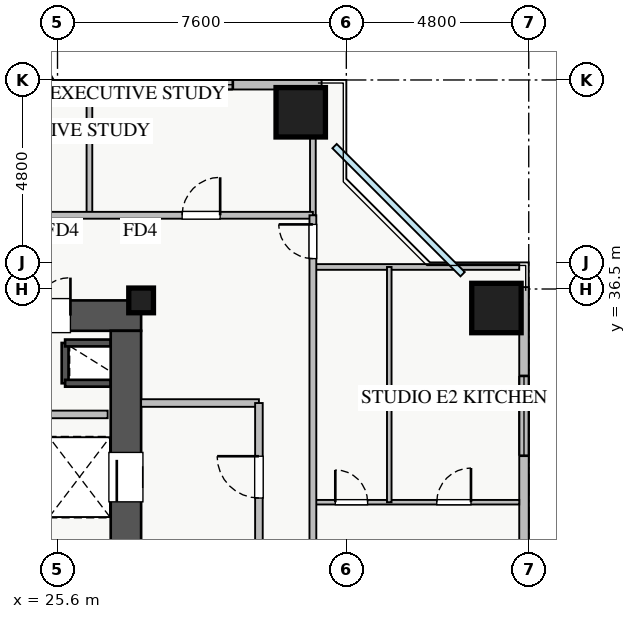
"""IFC4 building model, lengths in metres.
Left out: names, types, materials, properties, quantities, classifications, styles, units other than length and angle.
Written with IfcOpenShell. Run it as: python <this file> out.ifc"""

import sys

from ifc_helpers import new_model, si_unit, direction, frame, frame_2d, origin, origin_2d, place, context, subcontext, project, spatial, rectangle, extrude, source, transform, mapped, element, fill, save


model = new_model("IFC4")
c1 = context("Model", 3, precision=1e-05, world=origin(), true_north=direction((0.0, 1.0)))
c2 = subcontext(c1, "Body", "Model", "MODEL_VIEW")
j1 = project(units=[si_unit("LENGTHUNIT", "METRE"), si_unit("PLANEANGLEUNIT", "RADIAN")], contexts=[c1])
p1 = place(None, origin())
s1 = spatial("IfcSite", under=j1, at=p1, CompositionType="ELEMENT")
p2 = place(p1, origin())
s2 = spatial("IfcBuilding", under=s1, at=p2, CompositionType="ELEMENT")
p3 = place(p2, frame((0.0, 0.0, 69.75)))
s3 = spatial("IfcBuildingStorey", under=s2, at=p3, CompositionType="ELEMENT", Elevation=69.75)
p4 = place(p3, frame((25.8, 34.02, 0.0), z_axis=(0.0, 0.0, 1.0), x_axis=(0.0, 1.0, 0.0)))
e1 = element("IfcWall", 1, at=p4, inside=s3, PredefinedType="SHEAR", context=c2, shape_type="SweptSolid", body=[
    extrude(rectangle(XDim=1.06, YDim=0.18, at=frame_2d((0.53, 0.0))), origin(), (0.0, 0.0, 1.0), 3.07),
])
for number, where, z_axis, x_axis in (
    (2, (25.8, 35.08, 0.0), (0.0, 0.0, 1.0), (1.0, 0.0, 0.0)),
    (3, (25.8, 34.02, 0.0), (0.0, 0.0, 1.0), (1.0, 0.0, 0.0)),
):
    element("IfcWall", number, at=place(p3, frame(where, z_axis=z_axis, x_axis=x_axis)), inside=s3, PredefinedType="SHEAR", context=c2, shape_type="SweptSolid", body=[
        extrude(rectangle(XDim=1.2, YDim=0.18, at=frame_2d((0.6, 0.0))), origin(), (0.0, 0.0, 1.0), 3.07),
    ])
p5 = place(p3, frame((10.2, 35.8, 0.0), z_axis=(0.0, 0.0, 1.0), x_axis=(1.0, 0.0, 0.0)))
e4 = element("IfcWall", 4, at=p5, inside=s3, PredefinedType="SHEAR", context=c2, shape_type="SweptSolid", body=[
    extrude(rectangle(XDim=17.6, YDim=0.8, at=frame_2d((8.8, 0.0))), origin(), (0.0, 0.0, 1.0), 3.25),
])
p6 = place(p5, frame((1.15, 0.0, 0.0)))
e5 = element("IfcOpeningElement", 5, at=p6, cuts=e4, PredefinedType="OPENING", context=c2, shape_type="SweptSolid", body=[
    extrude(rectangle(XDim=1.1, YDim=2.05, at=frame_2d((0.55, 1.025))), frame((0.0, 0.41, 0.0), z_axis=(0.0, -1.0, 0.0), x_axis=(1.0, 0.0, 0.0)), (0.0, 0.0, 1.0), 0.82),
])
p7 = place(p5, frame((8.3, 0.0, 0.0)))
e6 = element("IfcOpeningElement", 6, at=p7, cuts=e4, PredefinedType="OPENING", context=c2, shape_type="SweptSolid", body=[
    extrude(rectangle(XDim=1.1, YDim=2.05, at=frame_2d((0.55, 1.025))), frame((0.0, 0.41, 0.0), z_axis=(0.0, -1.0, 0.0), x_axis=(1.0, 0.0, 0.0)), (0.0, 0.0, 1.0), 0.82),
])
p8 = place(p5, frame((10.05, 0.0, 0.0)))
e7 = element("IfcOpeningElement", 7, at=p8, cuts=e4, PredefinedType="OPENING", context=c2, shape_type="SweptSolid", body=[
    extrude(rectangle(XDim=1.1, YDim=2.05, at=frame_2d((0.55, 1.025))), frame((0.0, 0.41, 0.0), z_axis=(0.0, -1.0, 0.0), x_axis=(1.0, 0.0, 0.0)), (0.0, 0.0, 1.0), 0.82),
])
p9 = place(p5, frame((14.74, 0.0, 0.0)))
e8 = element("IfcOpeningElement", 8, at=p9, cuts=e4, PredefinedType="OPENING", context=c2, shape_type="SweptSolid", body=[
    extrude(rectangle(XDim=1.0, YDim=2.05, at=frame_2d((0.5, 1.025))), frame((0.0, 0.41, 0.0), z_axis=(0.0, -1.0, 0.0), x_axis=(1.0, 0.0, 0.0)), (0.0, 0.0, 1.0), 0.82),
])
p10 = place(p5, frame((11.835, 0.0, 0.0)))
e9 = element("IfcOpeningElement", 9, at=p10, cuts=e4, PredefinedType="OPENING", context=c2, shape_type="SweptSolid", body=[
    extrude(rectangle(XDim=1.0, YDim=2.05, at=frame_2d((0.5, 1.025))), frame((0.0, 0.41, 0.0), z_axis=(0.0, -1.0, 0.0), x_axis=(1.0, 0.0, 0.0)), (0.0, 0.0, 1.0), 0.82),
])
p11 = place(p5, frame((13.37, 0.0, 0.0)))
e10 = element("IfcOpeningElement", 10, at=p11, cuts=e4, PredefinedType="OPENING", context=c2, shape_type="SweptSolid", body=[
    extrude(rectangle(XDim=1.0, YDim=2.05, at=frame_2d((0.5, 1.025))), frame((0.0, 0.41, 0.0), z_axis=(0.0, -1.0, 0.0), x_axis=(1.0, 0.0, 0.0)), (0.0, 0.0, 1.0), 0.82),
])
p12 = place(p3, frame((27.4, 29.8, 0.0), z_axis=(0.0, 0.0, 1.0), x_axis=(0.0, 1.0, 0.0)))
e11 = element("IfcWall", 11, at=p12, inside=s3, PredefinedType="SHEAR", context=c2, shape_type="SweptSolid", body=[
    extrude(rectangle(XDim=5.6, YDim=0.8, at=frame_2d((2.8, 0.0))), origin(), (0.0, 0.0, 1.0), 3.25),
])
p13 = place(p12, frame((1.1, 0.0, 0.0)))
e12 = element("IfcOpeningElement", 12, at=p13, cuts=e11, PredefinedType="OPENING", context=c2, shape_type="SweptSolid", body=[
    extrude(rectangle(XDim=1.3, YDim=2.05, at=frame_2d((0.65, 1.025))), frame((0.0, 0.41, 0.0), z_axis=(0.0, -1.0, 0.0), x_axis=(1.0, 0.0, 0.0)), (0.0, 0.0, 1.0), 0.82),
])
m1 = source(origin(), c2, "Body", "SweptSolid", [
    extrude(rectangle(XDim=0.65, YDim=0.65, at=origin_2d()), origin(), (0.0, 0.0, 1.0), 3.25),
])
p14 = place(p3, frame((27.8, 36.2, 0.0), z_axis=(0.0, 0.0, 1.0), x_axis=(1.0, 0.0, 0.0)))
e13 = element("IfcColumn", 13, at=p14, inside=s3, PredefinedType="PILASTER", context=c2, shape_type="MappedRepresentation", body=[
    mapped(m1, transform((0.0, 0.0, 0.0), x_axis=(1.0, 0.0, 0.0), y_axis=(0.0, 1.0, 0.0), z_axis=(0.0, 0.0, 1.0), scale=1.0)),
])
m2 = source(origin(), c2, "Body", "SweptSolid", [
    extrude(rectangle(XDim=1.3, YDim=1.3, at=origin_2d()), origin(), (0.0, 0.0, 1.0), 3.25),
])
for number, where, z_axis, x_axis in (
    (14, (37.15, 36.0, 0.0), (0.0, 0.0, 1.0), (1.0, 0.0, 0.0)),
    (15, (32.0, 41.15, 0.0), (0.0, 0.0, 1.0), (1.0, 0.0, 0.0)),
):
    element("IfcColumn", number, at=place(p3, frame(where, z_axis=z_axis, x_axis=x_axis)), inside=s3, PredefinedType="COLUMN", context=c2, shape_type="MappedRepresentation", body=[
        mapped(m2, transform((0.0, 0.0, 0.0), x_axis=(1.0, 0.0, 0.0), y_axis=(0.0, 1.0, 0.0), z_axis=(0.0, 0.0, 1.0), scale=1.0)),
    ])
p15 = place(p3, frame((5.45, 41.875, 0.0), z_axis=(0.0, 0.0, 1.0), x_axis=(1.0, 0.0, 0.0)))
e16 = element("IfcWall", 16, at=p15, inside=s3, PredefinedType="STANDARD", context=c2, shape_type="SweptSolid", body=[
    extrude(rectangle(XDim=27.1, YDim=0.25, at=frame_2d((13.55, 0.0))), origin(), (0.0, 0.0, 1.0), 2.61),
])
p16 = place(p15, frame((14.4, 0.0, 0.0)))
e17 = element("IfcOpeningElement", 17, at=p16, cuts=e16, PredefinedType="OPENING", context=c2, shape_type="SweptSolid", body=[
    extrude(rectangle(XDim=1.2, YDim=2.1, at=frame_2d((0.6, 1.05))), frame((0.0, 0.135, 0.0), z_axis=(0.0, -1.0, 0.0), x_axis=(1.0, 0.0, 0.0)), (0.0, 0.0, 1.0), 0.27),
])
p17 = place(p15, frame((1.48, 0.0, 0.9)))
e18 = element("IfcOpeningElement", 18, at=p17, cuts=e16, PredefinedType="OPENING", context=c2, shape_type="SweptSolid", body=[
    extrude(rectangle(XDim=1.5, YDim=1.5, at=frame_2d((0.75, 0.75))), frame((0.0, 0.135, 0.0), z_axis=(0.0, -1.0, 0.0), x_axis=(1.0, 0.0, 0.0)), (0.0, 0.0, 1.0), 0.27),
])
p18 = place(p15, frame((7.725, 0.0, 0.9)))
e19 = element("IfcOpeningElement", 19, at=p18, cuts=e16, PredefinedType="OPENING", context=c2, shape_type="SweptSolid", body=[
    extrude(rectangle(XDim=1.8, YDim=1.5, at=frame_2d((0.9, 0.75))), frame((0.0, 0.135, 0.0), z_axis=(0.0, -1.0, 0.0), x_axis=(1.0, 0.0, 0.0)), (0.0, 0.0, 1.0), 0.27),
])
p19 = place(p15, frame((17.92, 0.0, 0.9)))
e20 = element("IfcOpeningElement", 20, at=p19, cuts=e16, PredefinedType="OPENING", context=c2, shape_type="SweptSolid", body=[
    extrude(rectangle(XDim=1.5, YDim=1.5, at=frame_2d((0.75, 0.75))), frame((0.0, 0.135, 0.0), z_axis=(0.0, -1.0, 0.0), x_axis=(1.0, 0.0, 0.0)), (0.0, 0.0, 1.0), 0.27),
])
p20 = place(p15, frame((22.663, 0.0, 0.9)))
e21 = element("IfcOpeningElement", 21, at=p20, cuts=e16, PredefinedType="OPENING", context=c2, shape_type="SweptSolid", body=[
    extrude(rectangle(XDim=2.1, YDim=1.48, at=frame_2d((1.05, 0.74))), frame((0.0, 0.135, 0.0), z_axis=(0.0, -1.0, 0.0), x_axis=(1.0, 0.0, 0.0)), (0.0, 0.0, 1.0), 0.27),
])
p21 = place(p15, frame((5.114, 0.0, 0.9)))
e22 = element("IfcOpeningElement", 22, at=p21, cuts=e16, PredefinedType="OPENING", context=c2, shape_type="SweptSolid", body=[
    extrude(rectangle(XDim=2.4, YDim=1.5, at=frame_2d((1.2, 0.75))), frame((0.0, 0.135, 0.0), z_axis=(0.0, -1.0, 0.0), x_axis=(1.0, 0.0, 0.0)), (0.0, 0.0, 1.0), 0.27),
])
p22 = place(p15, frame((10.893, 0.0, 0.9)))
e23 = element("IfcOpeningElement", 23, at=p22, cuts=e16, PredefinedType="OPENING", context=c2, shape_type="SweptSolid", body=[
    extrude(rectangle(XDim=2.4, YDim=1.5, at=frame_2d((1.2, 0.75))), frame((0.0, 0.135, 0.0), z_axis=(0.0, -1.0, 0.0), x_axis=(1.0, 0.0, 0.0)), (0.0, 0.0, 1.0), 0.27),
])
p23 = place(p3, frame((37.875, 9.45, 0.0), z_axis=(0.0, 0.0, 1.0), x_axis=(0.0, 1.0, 0.0)))
e24 = element("IfcWall", 24, at=p23, inside=s3, PredefinedType="STANDARD", context=c2, shape_type="SweptSolid", body=[
    extrude(rectangle(XDim=27.1, YDim=0.25, at=frame_2d((13.55, 0.0))), origin(), (0.0, 0.0, 1.0), 2.61),
])
p24 = place(p23, frame((14.4, 0.0, 0.0)))
e25 = element("IfcOpeningElement", 25, at=p24, cuts=e24, PredefinedType="OPENING", context=c2, shape_type="SweptSolid", body=[
    extrude(rectangle(XDim=1.2, YDim=2.1, at=frame_2d((0.6, 1.05))), frame((0.0, 0.135, 0.0), z_axis=(0.0, -1.0, 0.0), x_axis=(1.0, 0.0, 0.0)), (0.0, 0.0, 1.0), 0.27),
])
p25 = place(p23, frame((2.188, 0.0, 0.9)))
e26 = element("IfcOpeningElement", 26, at=p25, cuts=e24, PredefinedType="OPENING", context=c2, shape_type="SweptSolid", body=[
    extrude(rectangle(XDim=2.4, YDim=1.48, at=frame_2d((1.2, 0.74))), frame((0.0, 0.135, 0.0), z_axis=(0.0, -1.0, 0.0), x_axis=(1.0, 0.0, 0.0)), (0.0, 0.0, 1.0), 0.27),
])
p26 = place(p23, frame((22.663, 0.0, 0.9)))
e27 = element("IfcOpeningElement", 27, at=p26, cuts=e24, PredefinedType="OPENING", context=c2, shape_type="SweptSolid", body=[
    extrude(rectangle(XDim=2.1, YDim=1.48, at=frame_2d((1.05, 0.74))), frame((0.0, 0.135, 0.0), z_axis=(0.0, -1.0, 0.0), x_axis=(1.0, 0.0, 0.0)), (0.0, 0.0, 1.0), 0.27),
])
p27 = place(p23, frame((17.365, 0.0, 0.9)))
e28 = element("IfcOpeningElement", 28, at=p27, cuts=e24, PredefinedType="OPENING", context=c2, shape_type="SweptSolid", body=[
    extrude(rectangle(XDim=0.9, YDim=1.2, at=frame_2d((0.45, 0.6))), frame((0.0, 0.135, 0.0), z_axis=(0.0, -1.0, 0.0), x_axis=(1.0, 0.0, 0.0)), (0.0, 0.0, 1.0), 0.27),
])
p28 = place(p3, frame((27.8, 33.5, 0.0), z_axis=(0.0, 0.0, 1.0), x_axis=(1.0, 0.0, 0.0)))
e29 = element("IfcWall", 29, at=p28, inside=s3, PredefinedType="PARTITIONING", context=c2, shape_type="SweptSolid", body=[
    extrude(rectangle(XDim=3.1, YDim=0.2, at=frame_2d((1.55, 0.0))), origin(), (0.0, 0.0, 1.0), 3.07),
])
p29 = place(p3, frame((30.9, 29.6, 0.0), z_axis=(0.0, 0.0, 1.0), x_axis=(0.0, 1.0, 0.0)))
e30 = element("IfcWall", 30, at=p29, inside=s3, PredefinedType="PARTITIONING", context=c2, shape_type="SweptSolid", body=[
    extrude(rectangle(XDim=3.9, YDim=0.2, at=frame_2d((1.95, 0.0))), origin(), (0.0, 0.0, 1.0), 3.07),
])
p30 = place(p29, frame((1.4, 0.0, 0.0)))
e31 = element("IfcOpeningElement", 31, at=p30, cuts=e30, PredefinedType="OPENING", context=c2, shape_type="SweptSolid", body=[
    extrude(rectangle(XDim=1.1, YDim=2.05, at=frame_2d((0.55, 1.025))), frame((0.0, 0.11, 0.0), z_axis=(0.0, -1.0, 0.0), x_axis=(1.0, 0.0, 0.0)), (0.0, 0.0, 1.0), 0.22),
])
p31 = place(p3, frame((21.75, 33.2, 0.0), z_axis=(0.0, 0.0, 1.0), x_axis=(1.0, 0.0, 0.0)))
e32 = element("IfcWall", 32, at=p31, inside=s3, PredefinedType="PARTITIONING", context=c2, shape_type="SweptSolid", body=[
    extrude(rectangle(XDim=5.17, YDim=0.2, at=frame_2d((2.585, 0.0))), origin(), (0.0, 0.0, 1.0), 3.07),
])
for number, where, z_axis, x_axis in (
    (33, (26.44, 38.44, 0.0), (0.0, 0.0, 1.0), (0.0, 1.0, 0.0)),
    (34, (32.32, 38.44, 0.0), (0.0, 0.0, 1.0), (0.0, 1.0, 0.0)),
):
    element("IfcWall", number, at=place(p3, frame(where, z_axis=z_axis, x_axis=x_axis)), inside=s3, PredefinedType="PARTITIONING", context=c2, shape_type="SweptSolid", body=[
        extrude(rectangle(XDim=3.31, YDim=0.15, at=frame_2d((1.655, 0.0))), origin(), (0.0, 0.0, 1.0), 3.07),
    ])
p32 = place(p3, frame((8.78, 38.44, 0.0), z_axis=(0.0, 0.0, 1.0), x_axis=(1.0, 0.0, 0.0)))
e35 = element("IfcWall", 35, at=p32, inside=s3, PredefinedType="PARTITIONING", context=c2, shape_type="SweptSolid", body=[
    extrude(rectangle(XDim=23.54, YDim=0.18, at=frame_2d((11.77, 0.0))), origin(), (0.0, 0.0, 1.0), 3.07),
])
p33 = place(p32, frame((2.72, 0.0, 0.0)))
e36 = element("IfcOpeningElement", 36, at=p33, cuts=e35, PredefinedType="OPENING", context=c2, shape_type="SweptSolid", body=[
    extrude(rectangle(XDim=1.0, YDim=2.05, at=frame_2d((0.5, 1.025))), frame((0.0, 0.1, 0.0), z_axis=(0.0, -1.0, 0.0), x_axis=(1.0, 0.0, 0.0)), (0.0, 0.0, 1.0), 0.2),
])
p34 = place(p32, frame((9.23, 0.0, 0.0)))
e37 = element("IfcOpeningElement", 37, at=p34, cuts=e35, PredefinedType="OPENING", context=c2, shape_type="SweptSolid", body=[
    extrude(rectangle(XDim=1.0, YDim=2.05, at=frame_2d((0.5, 1.025))), frame((0.0, 0.1, 0.0), z_axis=(0.0, -1.0, 0.0), x_axis=(1.0, 0.0, 0.0)), (0.0, 0.0, 1.0), 0.2),
])
p35 = place(p32, frame((14.84, 0.0, 0.0)))
e38 = element("IfcOpeningElement", 38, at=p35, cuts=e35, PredefinedType="OPENING", context=c2, shape_type="SweptSolid", body=[
    extrude(rectangle(XDim=1.0, YDim=2.05, at=frame_2d((0.5, 1.025))), frame((0.0, 0.1, 0.0), z_axis=(0.0, -1.0, 0.0), x_axis=(1.0, 0.0, 0.0)), (0.0, 0.0, 1.0), 0.2),
])
p36 = place(p32, frame((20.1, 0.0, 0.0)))
e39 = element("IfcOpeningElement", 39, at=p36, cuts=e35, PredefinedType="OPENING", context=c2, shape_type="SweptSolid", body=[
    extrude(rectangle(XDim=1.0, YDim=2.05, at=frame_2d((0.5, 1.025))), frame((0.0, 0.1, 0.0), z_axis=(0.0, -1.0, 0.0), x_axis=(1.0, 0.0, 0.0)), (0.0, 0.0, 1.0), 0.2),
])
p37 = place(p3, frame((32.32, 37.08, 0.0), z_axis=(0.0, 0.0, 1.0), x_axis=(1.0, 0.0, 0.0)))
e40 = element("IfcWall", 40, at=p37, inside=s3, PredefinedType="PARTITIONING", context=c2, shape_type="SweptSolid", body=[
    extrude(rectangle(XDim=5.43, YDim=0.15, at=frame_2d((2.715, 0.0))), origin(), (0.0, 0.0, 1.0), 3.07),
])
p38 = place(p3, frame((32.32, 30.89, 0.0), z_axis=(0.0, 0.0, 1.0), x_axis=(1.0, 0.0, 0.0)))
e41 = element("IfcWall", 41, at=p38, inside=s3, PredefinedType="PLUMBINGWALL", context=c2, shape_type="SweptSolid", body=[
    extrude(rectangle(XDim=5.43, YDim=0.12, at=frame_2d((2.715, 0.0))), origin(), (0.0, 0.0, 1.0), 3.07),
])
p39 = place(p38, frame((0.59, 0.0, 0.0)))
e42 = element("IfcOpeningElement", 42, at=p39, cuts=e41, PredefinedType="OPENING", context=c2, shape_type="SweptSolid", body=[
    extrude(rectangle(XDim=0.85, YDim=2.05, at=frame_2d((0.425, 1.025))), frame((0.0, 0.07, 0.0), z_axis=(0.0, -1.0, 0.0), x_axis=(1.0, 0.0, 0.0)), (0.0, 0.0, 1.0), 0.14),
])
p40 = place(p38, frame((3.26, 0.0, 0.0)))
e43 = element("IfcOpeningElement", 43, at=p40, cuts=e41, PredefinedType="OPENING", context=c2, shape_type="SweptSolid", body=[
    extrude(rectangle(XDim=0.9, YDim=2.05, at=frame_2d((0.45, 1.025))), frame((0.0, 0.07, 0.0), z_axis=(0.0, -1.0, 0.0), x_axis=(1.0, 0.0, 0.0)), (0.0, 0.0, 1.0), 0.14),
])
p41 = place(p3, frame((34.33, 30.89, 0.0), z_axis=(0.0, 0.0, 1.0), x_axis=(0.0, 1.0, 0.0)))
e44 = element("IfcWall", 44, at=p41, inside=s3, PredefinedType="PLUMBINGWALL", context=c2, shape_type="SweptSolid", body=[
    extrude(rectangle(XDim=6.19, YDim=0.12, at=frame_2d((3.095, 0.0))), origin(), (0.0, 0.0, 1.0), 3.07),
])
p42 = place(p3, frame((32.32, 7.21, 0.0), z_axis=(0.0, 0.0, 1.0), x_axis=(0.0, 1.0, 0.0)))
e45 = element("IfcWall", 45, at=p42, inside=s3, PredefinedType="PARTITIONING", context=c2, shape_type="SweptSolid", body=[
    extrude(rectangle(XDim=31.23, YDim=0.18, at=frame_2d((15.615, 0.0))), origin(), (0.0, 0.0, 1.0), 2.765),
])
p43 = place(p42, frame((30.09, 0.0, 0.0)))
e46 = element("IfcOpeningElement", 46, at=p43, cuts=e45, PredefinedType="OPENING", context=c2, shape_type="SweptSolid", body=[
    extrude(rectangle(XDim=0.9, YDim=2.05, at=frame_2d((0.45, 1.025))), frame((0.0, 0.1, 0.0), z_axis=(0.0, -1.0, 0.0), x_axis=(1.0, 0.0, 0.0)), (0.0, 0.0, 1.0), 0.2),
])
p44 = place(p42, frame((0.415, 0.0, 0.0)))
e47 = element("IfcOpeningElement", 47, at=p44, cuts=e45, PredefinedType="OPENING", context=c2, shape_type="SweptSolid", body=[
    extrude(rectangle(XDim=0.9, YDim=2.05, at=frame_2d((0.45, 1.025))), frame((0.0, 0.1, 0.0), z_axis=(0.0, -1.0, 0.0), x_axis=(1.0, 0.0, 0.0)), (0.0, 0.0, 1.0), 0.2),
])
p45 = place(p42, frame((4.99, 0.0, 0.0)))
e48 = element("IfcOpeningElement", 48, at=p45, cuts=e45, PredefinedType="OPENING", context=c2, shape_type="SweptSolid", body=[
    extrude(rectangle(XDim=1.0, YDim=2.05, at=frame_2d((0.5, 1.025))), frame((0.0, 0.1, 0.0), z_axis=(0.0, -1.0, 0.0), x_axis=(1.0, 0.0, 0.0)), (0.0, 0.0, 1.0), 0.2),
])
p46 = place(p42, frame((19.355, 0.0, 0.0)))
e49 = element("IfcOpeningElement", 49, at=p46, cuts=e45, PredefinedType="OPENING", context=c2, shape_type="SweptSolid", body=[
    extrude(rectangle(XDim=1.0, YDim=2.05, at=frame_2d((0.5, 1.025))), frame((0.0, 0.1, 0.0), z_axis=(0.0, -1.0, 0.0), x_axis=(1.0, 0.0, 0.0)), (0.0, 0.0, 1.0), 0.2),
])
m3 = source(origin(), c2, "Body", "SweptSolid", [
    extrude(rectangle(XDim=2.1, YDim=1.48, at=frame_2d((1.05, 0.74))), frame((0.0, 0.03, 0.0), z_axis=(0.0, -1.0, 0.0), x_axis=(1.0, 0.0, 0.0)), (0.0, 0.0, 1.0), 0.06),
])
p47 = place(p20, origin())
e50 = element("IfcWindow", 50, at=p47, inside=s3, PartitioningType="TRIPLE_PANEL_VERTICAL", PredefinedType="WINDOW", context=c2, shape_type="MappedRepresentation", body=[
    mapped(m3, transform((0.0, 0.0, 0.0), x_axis=(1.0, 0.0, 0.0), y_axis=(0.0, 1.0, 0.0), z_axis=(0.0, 0.0, 1.0), scale=1.0)),
])
fill(e21, e50)
p48 = place(p26, origin())
e51 = element("IfcWindow", 51, at=p48, inside=s3, PartitioningType="TRIPLE_PANEL_VERTICAL", PredefinedType="WINDOW", context=c2, shape_type="MappedRepresentation", body=[
    mapped(m3, transform((0.0, 0.0, 0.0), x_axis=(1.0, 0.0, 0.0), y_axis=(0.0, 1.0, 0.0), z_axis=(0.0, 0.0, 1.0), scale=1.0)),
])
fill(e27, e51)
m4 = source(origin(), c2, "Body", "SweptSolid", [
    extrude(rectangle(XDim=1.3, YDim=2.05, at=frame_2d((0.65, 1.025))), frame((0.0, 0.025, 0.0), z_axis=(0.0, -1.0, 0.0), x_axis=(1.0, 0.0, 0.0)), (0.0, 0.0, 1.0), 0.05),
])
p49 = place(p13, origin())
e52 = element("IfcDoor", 52, at=p49, inside=s3, OperationType="SLIDING_TO_LEFT", PredefinedType="DOOR", context=c2, shape_type="MappedRepresentation", body=[
    mapped(m4, transform((0.0, 0.0, 0.0), x_axis=(1.0, 0.0, 0.0), y_axis=(0.0, 1.0, 0.0), z_axis=(0.0, 0.0, 1.0), scale=1.0)),
])
fill(e12, e52)
m5 = source(origin(), c2, "Body", "SweptSolid", [
    extrude(rectangle(XDim=1.0, YDim=2.05, at=frame_2d((0.5, 1.025))), frame((0.0, 0.025, 0.0), z_axis=(0.0, -1.0, 0.0), x_axis=(1.0, 0.0, 0.0)), (0.0, 0.0, 1.0), 0.05),
])
p50 = place(p9, origin())
e53 = element("IfcDoor", 53, at=p50, inside=s3, OperationType="SINGLE_SWING_RIGHT", PredefinedType="DOOR", context=c2, shape_type="MappedRepresentation", body=[
    mapped(m5, transform((0.0, 0.0, 0.0), x_axis=(1.0, 0.0, 0.0), y_axis=(0.0, 1.0, 0.0), z_axis=(0.0, 0.0, 1.0), scale=1.0)),
])
fill(e8, e53)
m6 = source(origin(), c2, "Body", "SweptSolid", [
    extrude(rectangle(XDim=1.1, YDim=2.05, at=frame_2d((0.55, 1.025))), frame((0.0, 0.025, 0.0), z_axis=(0.0, -1.0, 0.0), x_axis=(1.0, 0.0, 0.0)), (0.0, 0.0, 1.0), 0.05),
])
p51 = place(p30, origin())
e54 = element("IfcDoor", 54, at=p51, inside=s3, OperationType="SINGLE_SWING_RIGHT", PredefinedType="DOOR", context=c2, shape_type="MappedRepresentation", body=[
    mapped(m6, transform((0.0, 0.0, 0.0), x_axis=(1.0, 0.0, 0.0), y_axis=(0.0, 1.0, 0.0), z_axis=(0.0, 0.0, 1.0), scale=1.0)),
])
fill(e31, e54)
p52 = place(p36, origin())
e55 = element("IfcDoor", 55, at=p52, inside=s3, OperationType="SINGLE_SWING_RIGHT", PredefinedType="DOOR", context=c2, shape_type="MappedRepresentation", body=[
    mapped(m5, transform((0.0, 0.0, 0.0), x_axis=(1.0, 0.0, 0.0), y_axis=(0.0, 1.0, 0.0), z_axis=(0.0, 0.0, 1.0), scale=1.0)),
])
fill(e39, e55)
m7 = source(origin(), c2, "Body", "SweptSolid", [
    extrude(rectangle(XDim=0.85, YDim=2.05, at=frame_2d((0.425, 1.025))), frame((0.0, 0.025, 0.0), z_axis=(0.0, -1.0, 0.0), x_axis=(1.0, 0.0, 0.0)), (0.0, 0.0, 1.0), 0.05),
])
p53 = place(p39, origin())
e56 = element("IfcDoor", 56, at=p53, inside=s3, OperationType="SINGLE_SWING_LEFT", PredefinedType="DOOR", context=c2, shape_type="MappedRepresentation", body=[
    mapped(m7, transform((0.0, 0.0, 0.0), x_axis=(1.0, 0.0, 0.0), y_axis=(0.0, 1.0, 0.0), z_axis=(0.0, 0.0, 1.0), scale=1.0)),
])
fill(e42, e56)
m8 = source(origin(), c2, "Body", "SweptSolid", [
    extrude(rectangle(XDim=0.9, YDim=2.05, at=frame_2d((0.45, 1.025))), frame((0.0, 0.025, 0.0), z_axis=(0.0, -1.0, 0.0), x_axis=(1.0, 0.0, 0.0)), (0.0, 0.0, 1.0), 0.05),
])
p54 = place(p40, origin())
e57 = element("IfcDoor", 57, at=p54, inside=s3, OperationType="SINGLE_SWING_RIGHT", PredefinedType="DOOR", context=c2, shape_type="MappedRepresentation", body=[
    mapped(m8, transform((0.0, 0.0, 0.0), x_axis=(1.0, 0.0, 0.0), y_axis=(0.0, 1.0, 0.0), z_axis=(0.0, 0.0, 1.0), scale=1.0)),
])
fill(e43, e57)
p55 = place(p43, origin())
e58 = element("IfcDoor", 58, at=p55, inside=s3, OperationType="SINGLE_SWING_RIGHT", PredefinedType="DOOR", context=c2, shape_type="MappedRepresentation", body=[
    mapped(m8, transform((0.0, 0.0, 0.0), x_axis=(1.0, 0.0, 0.0), y_axis=(0.0, 1.0, 0.0), z_axis=(0.0, 0.0, 1.0), scale=1.0)),
])
fill(e46, e58)
save(model, sys.argv[1])
